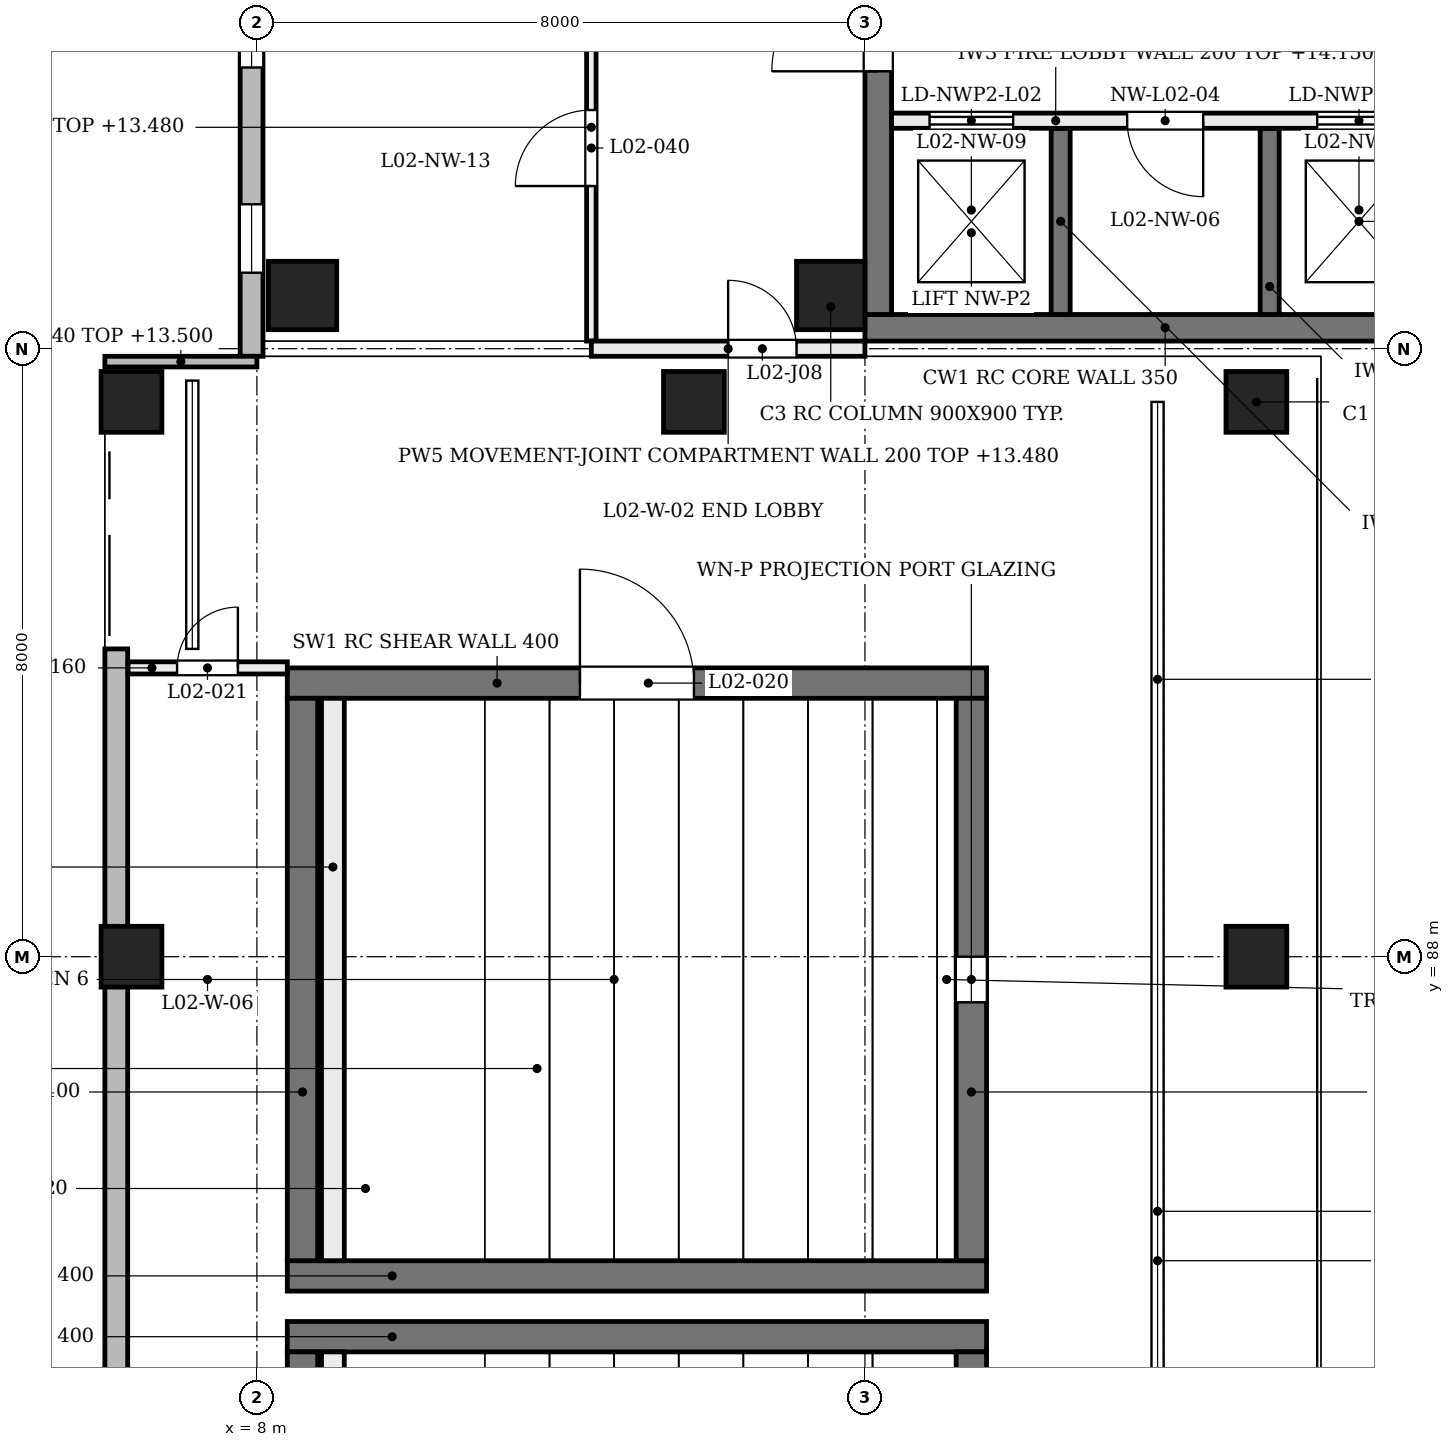
"""IFC4 building model, lengths in metres.
Left out: names, types, materials, properties, quantities, classifications, styles, units other than length and angle.
Written with IfcOpenShell. Run it as: python <this file> out.ifc"""

import sys

from ifc_helpers import new_model, si_unit, direction, frame, frame_2d, origin, origin_2d, place, context, subcontext, project, spatial, rectangle, extrude, element, fill, save


model = new_model("IFC4")
c1 = context("Model", 3, precision=1e-05, world=origin(), true_north=direction((0.0, 1.0)))
c2 = subcontext(c1, "Body", "Model", "MODEL_VIEW")
j1 = project(units=[si_unit("LENGTHUNIT", "METRE"), si_unit("PLANEANGLEUNIT", "RADIAN")], contexts=[c1])
p1 = place(None, origin())
s1 = spatial("IfcSite", under=j1, at=p1, CompositionType="ELEMENT")
p2 = place(p1, origin())
s2 = spatial("IfcBuilding", under=s1, at=p2, CompositionType="ELEMENT")
p3 = place(p2, frame((0.0, 0.0, 9.6)))
s3 = spatial("IfcBuildingStorey", under=s2, at=p3, CompositionType="ELEMENT", Elevation=9.6)
p4 = place(p3, frame((8.4, 83.0, 0.0), z_axis=(0.0, 0.0, 1.0), x_axis=(1.0, 0.0, 0.0)))
e1 = element("IfcWall", 1, at=p4, inside=s3, PredefinedType="SHEAR", context=c2, shape_type="SweptSolid", body=[
    extrude(rectangle(XDim=9.2, YDim=0.4, at=frame_2d((4.6, 0.0))), origin(), (0.0, 0.0, 1.0), 4.58),
])
p5 = place(p3, frame((8.6, 75.8, 0.0), z_axis=(0.0, 0.0, 1.0), x_axis=(0.0, 1.0, 0.0)))
e2 = element("IfcWall", 2, at=p5, inside=s3, PredefinedType="SHEAR", context=c2, shape_type="SweptSolid", body=[
    extrude(rectangle(XDim=7.0, YDim=0.4, at=frame_2d((3.5, 0.0))), origin(), (0.0, 0.0, 1.0), 4.58),
])
p6 = place(p3, frame((17.4, 75.8, 0.0), z_axis=(0.0, 0.0, 1.0), x_axis=(0.0, 1.0, 0.0)))
e3 = element("IfcWall", 3, at=p6, inside=s3, PredefinedType="SHEAR", context=c2, shape_type="SweptSolid", body=[
    extrude(rectangle(XDim=7.0, YDim=0.4, at=frame_2d((3.5, 0.0))), origin(), (0.0, 0.0, 1.0), 4.58),
])
p7 = place(p6, frame((2.825, 0.0, 0.0)))
e4 = element("IfcOpeningElement", 4, at=p7, cuts=e3, PredefinedType="OPENING", context=c2, shape_type="SweptSolid", body=[
    extrude(rectangle(XDim=1.5, YDim=2.1, at=frame_2d((0.75, 1.05))), frame((0.0, 0.21, 0.0), z_axis=(0.0, -1.0, 0.0), x_axis=(1.0, 0.0, 0.0)), (0.0, 0.0, 1.0), 0.42),
])
p8 = place(p6, frame((3.2, 0.0, 3.72)))
e5 = element("IfcOpeningElement", 5, at=p8, cuts=e3, PredefinedType="OPENING", context=c2, shape_type="SweptSolid", body=[
    extrude(rectangle(XDim=0.6, YDim=0.5, at=frame_2d((0.3, 0.25))), frame((0.0, 0.21, 0.0), z_axis=(0.0, -1.0, 0.0), x_axis=(1.0, 0.0, 0.0)), (0.0, 0.0, 1.0), 0.42),
])
p9 = place(p3, frame((8.4, 83.8, 0.0), z_axis=(0.0, 0.0, 1.0), x_axis=(1.0, 0.0, 0.0)))
e6 = element("IfcWall", 6, at=p9, inside=s3, PredefinedType="SHEAR", context=c2, shape_type="SweptSolid", body=[
    extrude(rectangle(XDim=9.2, YDim=0.4, at=frame_2d((4.6, 0.0))), origin(), (0.0, 0.0, 1.0), 4.58),
])
p10 = place(p3, frame((8.4, 91.6, 0.0), z_axis=(0.0, 0.0, 1.0), x_axis=(1.0, 0.0, 0.0)))
e7 = element("IfcWall", 7, at=p10, inside=s3, PredefinedType="SHEAR", context=c2, shape_type="SweptSolid", body=[
    extrude(rectangle(XDim=9.2, YDim=0.4, at=frame_2d((4.6, 0.0))), origin(), (0.0, 0.0, 1.0), 4.58),
])
p11 = place(p10, frame((3.85, 0.0, 0.0)))
e8 = element("IfcOpeningElement", 8, at=p11, cuts=e7, PredefinedType="OPENING", context=c2, shape_type="SweptSolid", body=[
    extrude(rectangle(XDim=1.5, YDim=2.1, at=frame_2d((0.75, 1.05))), frame((0.0, 0.21, 0.0), z_axis=(0.0, -1.0, 0.0), x_axis=(1.0, 0.0, 0.0)), (0.0, 0.0, 1.0), 0.42),
])
p12 = place(p3, frame((8.6, 84.0, 0.0), z_axis=(0.0, 0.0, 1.0), x_axis=(0.0, 1.0, 0.0)))
e9 = element("IfcWall", 9, at=p12, inside=s3, PredefinedType="SHEAR", context=c2, shape_type="SweptSolid", body=[
    extrude(rectangle(XDim=7.4, YDim=0.4, at=frame_2d((3.7, 0.0))), origin(), (0.0, 0.0, 1.0), 4.58),
])
p13 = place(p3, frame((17.4, 84.0, 0.0), z_axis=(0.0, 0.0, 1.0), x_axis=(0.0, 1.0, 0.0)))
e10 = element("IfcWall", 10, at=p13, inside=s3, PredefinedType="SHEAR", context=c2, shape_type="SweptSolid", body=[
    extrude(rectangle(XDim=7.4, YDim=0.4, at=frame_2d((3.7, 0.0))), origin(), (0.0, 0.0, 1.0), 4.58),
])
p14 = place(p13, frame((3.4, 0.0, 3.88)))
e11 = element("IfcOpeningElement", 11, at=p14, cuts=e10, PredefinedType="OPENING", context=c2, shape_type="SweptSolid", body=[
    extrude(rectangle(XDim=0.6, YDim=0.5, at=frame_2d((0.3, 0.25))), frame((0.0, 0.21, 0.0), z_axis=(0.0, -1.0, 0.0), x_axis=(1.0, 0.0, 0.0)), (0.0, 0.0, 1.0), 0.42),
])
p15 = place(p3, frame((16.0, 96.275, 0.0), z_axis=(0.0, 0.0, 1.0), x_axis=(1.0, 0.0, 0.0)))
e12 = element("IfcWall", 12, at=p15, inside=s3, PredefinedType="SHEAR", context=c2, shape_type="SweptSolid", body=[
    extrude(rectangle(XDim=7.9, YDim=0.35, at=frame_2d((3.95, 0.0))), origin(), (0.0, 0.0, 1.0), 4.58),
])
p16 = place(p3, frame((16.175, 96.45, 0.0), z_axis=(0.0, 0.0, 1.0), x_axis=(0.0, 1.0, 0.0)))
e13 = element("IfcWall", 13, at=p16, inside=s3, PredefinedType="SHEAR", context=c2, shape_type="SweptSolid", body=[
    extrude(rectangle(XDim=15.2, YDim=0.35, at=frame_2d((7.6, 0.0))), origin(), (0.0, 0.0, 1.0), 4.58),
])
p17 = place(p16, frame((13.25, 0.0, 0.0)))
e14 = element("IfcOpeningElement", 14, at=p17, cuts=e13, PredefinedType="OPENING", context=c2, shape_type="SweptSolid", body=[
    extrude(rectangle(XDim=1.0, YDim=2.1, at=frame_2d((0.5, 1.05))), frame((0.0, 0.185, 0.0), z_axis=(0.0, -1.0, 0.0), x_axis=(1.0, 0.0, 0.0)), (0.0, 0.0, 1.0), 0.37),
])
p18 = place(p16, frame((3.2, 0.0, 0.0)))
e15 = element("IfcOpeningElement", 15, at=p18, cuts=e13, PredefinedType="OPENING", context=c2, shape_type="SweptSolid", body=[
    extrude(rectangle(XDim=1.4, YDim=2.1, at=frame_2d((0.7, 1.05))), frame((0.0, 0.185, 0.0), z_axis=(0.0, -1.0, 0.0), x_axis=(1.0, 0.0, 0.0)), (0.0, 0.0, 1.0), 0.37),
])
for number, where, z_axis, x_axis in (
    (16, (8.6, 96.7, 0.0), (0.0, 0.0, 1.0), (1.0, 0.0, 0.0)),
    (17, (15.55, 96.7, 0.0), (0.0, 0.0, 1.0), (1.0, 0.0, 0.0)),
):
    element("IfcColumn", number, at=place(p3, frame(where, z_axis=z_axis, x_axis=x_axis)), inside=s3, PredefinedType="COLUMN", context=c2, shape_type="SweptSolid", body=[
        extrude(rectangle(XDim=0.9, YDim=0.9, at=origin_2d()), origin(), (0.0, 0.0, 1.0), 4.8),
    ])
for number, where, z_axis, x_axis in (
    (18, (6.6, 88.0, 0.0), (-0.204, 0.0, 0.979), (0.0, -1.0, 0.0)),
    (19, (6.6, 95.3, 0.0), (-0.204, 0.0, 0.979), (0.0, -1.0, 0.0)),
    (20, (14.0, 95.3, 0.0), (-0.204, 0.0, 0.979), (0.0, -1.0, 0.0)),
    (21, (21.4, 88.0, 0.0), (-0.204, 0.0, 0.979), (0.0, -1.0, 0.0)),
    (22, (21.4, 95.3, 0.0), (-0.204, 0.0, 0.979), (0.0, -1.0, 0.0)),
):
    element("IfcColumn", number, at=place(p3, frame(where, z_axis=z_axis, x_axis=x_axis)), inside=s3, PredefinedType="COLUMN", context=c2, shape_type="SweptSolid", body=[
        extrude(rectangle(XDim=0.8, YDim=0.8, at=origin_2d()), origin(), (0.0, 0.0, 1.0), 4.903),
    ])
p19 = place(p3, frame((6.15, 67.95, 0.0), z_axis=(0.0, 0.0, 1.0), x_axis=(0.0, 1.0, 0.0)))
e23 = element("IfcWall", 23, at=p19, inside=s3, PredefinedType="SOLIDWALL", context=c2, shape_type="SweptSolid", body=[
    extrude(rectangle(XDim=24.1, YDim=0.3, at=frame_2d((12.05, 0.0))), origin(), (0.0, 0.0, 1.0), 3.9),
])
p20 = place(p3, frame((19.85, 80.2, 4.1), z_axis=(0.0, 0.0, 1.0), x_axis=(0.0, 1.0, 0.0)))
e24 = element("IfcWall", 24, at=p20, inside=s3, PredefinedType="SOLIDWALL", context=c2, shape_type="SweptSolid", body=[
    extrude(rectangle(XDim=7.6, YDim=0.15, at=frame_2d((3.8, 0.0))), origin(), (0.0, 0.0, 1.0), 0.48),
])
p21 = place(p3, frame((19.85, 88.2, 4.1), z_axis=(0.0, 0.0, 1.0), x_axis=(0.0, 1.0, 0.0)))
e25 = element("IfcWall", 25, at=p21, inside=s3, PredefinedType="SOLIDWALL", context=c2, shape_type="SweptSolid", body=[
    extrude(rectangle(XDim=6.9, YDim=0.15, at=frame_2d((3.45, 0.0))), origin(), (0.0, 0.0, 1.0), 0.48),
])
p22 = place(p3, frame((7.93, 95.9, 0.0), z_axis=(0.0, 0.0, 1.0), x_axis=(0.0, 1.0, 0.0)))
e26 = element("IfcWall", 26, at=p22, inside=s3, PredefinedType="SOLIDWALL", context=c2, shape_type="SweptSolid", body=[
    extrude(rectangle(XDim=16.4, YDim=0.3, at=frame_2d((8.2, 0.0))), origin(), (0.0, 0.0, 1.0), 3.9),
])
p23 = place(p22, frame((1.1, 0.0, 0.75)))
e27 = element("IfcOpeningElement", 27, at=p23, cuts=e26, PredefinedType="OPENING", context=c2, shape_type="SweptSolid", body=[
    extrude(rectangle(XDim=0.9, YDim=3.1, at=frame_2d((0.45, 1.55))), frame((0.0, 0.16, 0.0), z_axis=(0.0, -1.0, 0.0), x_axis=(1.0, 0.0, 0.0)), (0.0, 0.0, 1.0), 0.32),
])
p24 = place(p22, frame((3.8, 0.0, 0.75)))
e28 = element("IfcOpeningElement", 28, at=p24, cuts=e26, PredefinedType="OPENING", context=c2, shape_type="SweptSolid", body=[
    extrude(rectangle(XDim=0.9, YDim=3.1, at=frame_2d((0.45, 1.55))), frame((0.0, 0.16, 0.0), z_axis=(0.0, -1.0, 0.0), x_axis=(1.0, 0.0, 0.0)), (0.0, 0.0, 1.0), 0.32),
])
p25 = place(p22, frame((6.5, 0.0, 0.75)))
e29 = element("IfcOpeningElement", 29, at=p25, cuts=e26, PredefinedType="OPENING", context=c2, shape_type="SweptSolid", body=[
    extrude(rectangle(XDim=0.9, YDim=3.1, at=frame_2d((0.45, 1.55))), frame((0.0, 0.16, 0.0), z_axis=(0.0, -1.0, 0.0), x_axis=(1.0, 0.0, 0.0)), (0.0, 0.0, 1.0), 0.32),
])
p26 = place(p22, frame((9.2, 0.0, 0.75)))
e30 = element("IfcOpeningElement", 30, at=p26, cuts=e26, PredefinedType="OPENING", context=c2, shape_type="SweptSolid", body=[
    extrude(rectangle(XDim=0.9, YDim=3.1, at=frame_2d((0.45, 1.55))), frame((0.0, 0.16, 0.0), z_axis=(0.0, -1.0, 0.0), x_axis=(1.0, 0.0, 0.0)), (0.0, 0.0, 1.0), 0.32),
])
p27 = place(p22, frame((11.9, 0.0, 0.75)))
e31 = element("IfcOpeningElement", 31, at=p27, cuts=e26, PredefinedType="OPENING", context=c2, shape_type="SweptSolid", body=[
    extrude(rectangle(XDim=0.9, YDim=3.1, at=frame_2d((0.45, 1.55))), frame((0.0, 0.16, 0.0), z_axis=(0.0, -1.0, 0.0), x_axis=(1.0, 0.0, 0.0)), (0.0, 0.0, 1.0), 0.32),
])
p28 = place(p22, frame((14.6, 0.0, 0.75)))
e32 = element("IfcOpeningElement", 32, at=p28, cuts=e26, PredefinedType="OPENING", context=c2, shape_type="SweptSolid", body=[
    extrude(rectangle(XDim=0.9, YDim=3.1, at=frame_2d((0.45, 1.55))), frame((0.0, 0.16, 0.0), z_axis=(0.0, -1.0, 0.0), x_axis=(1.0, 0.0, 0.0)), (0.0, 0.0, 1.0), 0.32),
])
p29 = place(p3, frame((6.0, 95.83, 0.0), z_axis=(0.0, 0.0, 1.0), x_axis=(1.0, 0.0, 0.0)))
e33 = element("IfcWall", 33, at=p29, inside=s3, PredefinedType="SOLIDWALL", context=c2, shape_type="SweptSolid", body=[
    extrude(rectangle(XDim=2.0, YDim=0.14, at=frame_2d((1.0, 0.0))), origin(), (0.0, 0.0, 1.0), 3.9),
])
for number, where, z_axis, x_axis in (
    (34, (18.575, 98.9, 0.0), (0.0, 0.0, 1.0), (0.0, -1.0, 0.0)),
    (35, (21.325, 98.9, 0.0), (0.0, 0.0, 1.0), (0.0, -1.0, 0.0)),
):
    element("IfcWall", number, at=place(p3, frame(where, z_axis=z_axis, x_axis=x_axis)), inside=s3, PredefinedType="SOLIDWALL", context=c2, shape_type="SweptSolid", body=[
        extrude(rectangle(XDim=2.45, YDim=0.25, at=frame_2d((1.225, 0.0))), origin(), (0.0, 0.0, 1.0), 4.55),
    ])
p30 = place(p3, frame((16.35, 99.0, 0.0), z_axis=(0.0, 0.0, 1.0), x_axis=(1.0, 0.0, 0.0)))
e36 = element("IfcWall", 36, at=p30, inside=s3, PredefinedType="SOLIDWALL", context=c2, shape_type="SweptSolid", body=[
    extrude(rectangle(XDim=7.2, YDim=0.2, at=frame_2d((3.6, 0.0))), origin(), (0.0, 0.0, 1.0), 4.55),
])
p31 = place(p30, frame((0.5, 0.0, 0.0)))
e37 = element("IfcOpeningElement", 37, at=p31, cuts=e36, PredefinedType="OPENING", context=c2, shape_type="SweptSolid", body=[
    extrude(rectangle(XDim=1.1, YDim=2.1, at=frame_2d((0.55, 1.05))), frame((0.0, 0.11, 0.0), z_axis=(0.0, -1.0, 0.0), x_axis=(1.0, 0.0, 0.0)), (0.0, 0.0, 1.0), 0.22),
])
p32 = place(p30, frame((5.6, 0.0, 0.0)))
e38 = element("IfcOpeningElement", 38, at=p32, cuts=e36, PredefinedType="OPENING", context=c2, shape_type="SweptSolid", body=[
    extrude(rectangle(XDim=1.1, YDim=2.1, at=frame_2d((0.55, 1.05))), frame((0.0, 0.11, 0.0), z_axis=(0.0, -1.0, 0.0), x_axis=(1.0, 0.0, 0.0)), (0.0, 0.0, 1.0), 0.22),
])
p33 = place(p30, frame((3.1, 0.0, 0.0)))
e39 = element("IfcOpeningElement", 39, at=p33, cuts=e36, PredefinedType="OPENING", context=c2, shape_type="SweptSolid", body=[
    extrude(rectangle(XDim=1.0, YDim=2.1, at=frame_2d((0.5, 1.05))), frame((0.0, 0.11, 0.0), z_axis=(0.0, -1.0, 0.0), x_axis=(1.0, 0.0, 0.0)), (0.0, 0.0, 1.0), 0.22),
])
p34 = place(p3, frame((6.305, 91.8, 0.0), z_axis=(0.0, 0.0, 1.0), x_axis=(1.0, 0.0, 0.0)))
e40 = element("IfcWall", 40, at=p34, inside=s3, PredefinedType="PARTITIONING", context=c2, shape_type="SweptSolid", body=[
    extrude(rectangle(XDim=2.095, YDim=0.16, at=frame_2d((1.047, 0.0))), origin(), (0.0, 0.0, 1.0), 4.56),
])
p35 = place(p34, frame((0.645, 0.0, 0.0)))
e41 = element("IfcOpeningElement", 41, at=p35, cuts=e40, PredefinedType="OPENING", context=c2, shape_type="SweptSolid", body=[
    extrude(rectangle(XDim=0.8, YDim=2.1, at=frame_2d((0.4, 1.05))), frame((0.0, 0.09, 0.0), z_axis=(0.0, -1.0, 0.0), x_axis=(1.0, 0.0, 0.0)), (0.0, 0.0, 1.0), 0.18),
])
p36 = place(p3, frame((12.4, 96.1, 0.0), z_axis=(0.0, 0.0, 1.0), x_axis=(0.0, 1.0, 0.0)))
e42 = element("IfcWall", 42, at=p36, inside=s3, PredefinedType="PARTITIONING", context=c2, shape_type="SweptSolid", body=[
    extrude(rectangle(XDim=9.377, YDim=0.125, at=frame_2d((4.688, 0.0))), origin(), (0.0, 0.0, 1.0), 3.88),
])
p37 = place(p36, frame((2.04, 0.0, 0.0)))
e43 = element("IfcOpeningElement", 43, at=p37, cuts=e42, PredefinedType="OPENING", context=c2, shape_type="SweptSolid", body=[
    extrude(rectangle(XDim=1.0, YDim=2.1, at=frame_2d((0.5, 1.05))), frame((0.0, 0.073, 0.0), z_axis=(0.0, -1.0, 0.0), x_axis=(1.0, 0.0, 0.0)), (0.0, 0.0, 1.0), 0.145),
])
p38 = place(p3, frame((12.4, 96.0, 0.0), z_axis=(0.0, 0.0, 1.0), x_axis=(1.0, 0.0, 0.0)))
e44 = element("IfcWall", 44, at=p38, inside=s3, PredefinedType="PARTITIONING", context=c2, shape_type="SweptSolid", body=[
    extrude(rectangle(XDim=3.6, YDim=0.2, at=frame_2d((1.8, 0.0))), origin(), (0.0, 0.0, 1.0), 3.88),
])
p39 = place(p38, frame((1.8, 0.0, 0.0)))
e45 = element("IfcOpeningElement", 45, at=p39, cuts=e44, PredefinedType="OPENING", context=c2, shape_type="SweptSolid", body=[
    extrude(rectangle(XDim=0.9, YDim=2.1, at=frame_2d((0.45, 1.05))), frame((0.0, 0.11, 0.0), z_axis=(0.0, -1.0, 0.0), x_axis=(1.0, 0.0, 0.0)), (0.0, 0.0, 1.0), 0.22),
])
p40 = place(p3, frame((9.0, 75.8, 0.0), z_axis=(0.0, 0.0, 1.0), x_axis=(0.0, 1.0, 0.0)))
e46 = element("IfcWall", 46, at=p40, inside=s3, PredefinedType="PARTITIONING", context=c2, shape_type="SweptSolid", body=[
    extrude(rectangle(XDim=7.0, YDim=0.3, at=frame_2d((3.5, 0.0))), origin(), (0.0, 0.0, 1.0), 6.95),
])
p41 = place(p3, frame((9.0, 84.0, 0.0), z_axis=(0.0, 0.0, 1.0), x_axis=(0.0, 1.0, 0.0)))
e47 = element("IfcWall", 47, at=p41, inside=s3, PredefinedType="PARTITIONING", context=c2, shape_type="SweptSolid", body=[
    extrude(rectangle(XDim=7.4, YDim=0.3, at=frame_2d((3.7, 0.0))), origin(), (0.0, 0.0, 1.0), 6.95),
])
p42 = place(p23, origin())
e48 = element("IfcWindow", 48, at=p42, inside=s3, PartitioningType="SINGLE_PANEL", PredefinedType="WINDOW", context=c2, shape_type="SweptSolid", body=[
    extrude(rectangle(XDim=0.9, YDim=3.1, at=frame_2d((0.45, 1.55))), frame((0.0, 0.03, 0.0), z_axis=(0.0, -1.0, 0.0), x_axis=(1.0, 0.0, 0.0)), (0.0, 0.0, 1.0), 0.06),
])
fill(e27, e48)
p43 = place(p24, origin())
e49 = element("IfcWindow", 49, at=p43, inside=s3, PartitioningType="SINGLE_PANEL", PredefinedType="WINDOW", context=c2, shape_type="SweptSolid", body=[
    extrude(rectangle(XDim=0.9, YDim=3.1, at=frame_2d((0.45, 1.55))), frame((0.0, 0.03, 0.0), z_axis=(0.0, -1.0, 0.0), x_axis=(1.0, 0.0, 0.0)), (0.0, 0.0, 1.0), 0.06),
])
fill(e28, e49)
p44 = place(p31, origin())
e50 = element("IfcDoor", 50, at=p44, inside=s3, OperationType="DOUBLE_DOOR_SLIDING", PredefinedType="DOOR", context=c2, shape_type="SweptSolid", body=[
    extrude(rectangle(XDim=1.1, YDim=2.1, at=frame_2d((0.55, 1.05))), frame((0.0, 0.025, 0.0), z_axis=(0.0, -1.0, 0.0), x_axis=(1.0, 0.0, 0.0)), (0.0, 0.0, 1.0), 0.05),
])
fill(e37, e50)
p45 = place(p32, origin())
e51 = element("IfcDoor", 51, at=p45, inside=s3, OperationType="DOUBLE_DOOR_SLIDING", PredefinedType="DOOR", context=c2, shape_type="SweptSolid", body=[
    extrude(rectangle(XDim=1.1, YDim=2.1, at=frame_2d((0.55, 1.05))), frame((0.0, 0.025, 0.0), z_axis=(0.0, -1.0, 0.0), x_axis=(1.0, 0.0, 0.0)), (0.0, 0.0, 1.0), 0.05),
])
fill(e38, e51)
p46 = place(p33, origin())
e52 = element("IfcDoor", 52, at=p46, inside=s3, OperationType="SINGLE_SWING_RIGHT", PredefinedType="DOOR", context=c2, shape_type="SweptSolid", body=[
    extrude(rectangle(XDim=1.0, YDim=2.1, at=frame_2d((0.5, 1.05))), frame((0.0, 0.025, 0.0), z_axis=(0.0, -1.0, 0.0), x_axis=(1.0, 0.0, 0.0)), (0.0, 0.0, 1.0), 0.05),
])
fill(e39, e52)
p47 = place(p18, origin())
e53 = element("IfcDoor", 53, at=p47, inside=s3, OperationType="SINGLE_SWING_LEFT", PredefinedType="DOOR", context=c2, shape_type="SweptSolid", body=[
    extrude(rectangle(XDim=1.4, YDim=2.1, at=frame_2d((0.7, 1.05))), frame((0.0, 0.025, 0.0), z_axis=(0.0, -1.0, 0.0), x_axis=(1.0, 0.0, 0.0)), (0.0, 0.0, 1.0), 0.05),
])
fill(e15, e53)
p48 = place(p11, origin())
e54 = element("IfcDoor", 54, at=p48, inside=s3, OperationType="SINGLE_SWING_LEFT", PredefinedType="DOOR", context=c2, shape_type="SweptSolid", body=[
    extrude(rectangle(XDim=1.5, YDim=2.1, at=frame_2d((0.75, 1.05))), frame((0.0, 0.025, 0.0), z_axis=(0.0, -1.0, 0.0), x_axis=(1.0, 0.0, 0.0)), (0.0, 0.0, 1.0), 0.05),
])
fill(e8, e54)
p49 = place(p35, frame((0.8, 0.0, 0.0), z_axis=(0.0, 0.0, 1.0), x_axis=(-1.0, 0.0, 0.0)))
e55 = element("IfcDoor", 55, at=p49, inside=s3, OperationType="SINGLE_SWING_RIGHT", PredefinedType="DOOR", context=c2, shape_type="SweptSolid", body=[
    extrude(rectangle(XDim=0.8, YDim=2.1, at=frame_2d((0.4, 1.05))), frame((0.0, 0.025, 0.0), z_axis=(0.0, -1.0, 0.0), x_axis=(1.0, 0.0, 0.0)), (0.0, 0.0, 1.0), 0.05),
])
fill(e41, e55)
p50 = place(p37, origin())
e56 = element("IfcDoor", 56, at=p50, inside=s3, OperationType="SINGLE_SWING_LEFT", PredefinedType="DOOR", context=c2, shape_type="SweptSolid", body=[
    extrude(rectangle(XDim=1.0, YDim=2.1, at=frame_2d((0.5, 1.05))), frame((0.0, 0.025, 0.0), z_axis=(0.0, -1.0, 0.0), x_axis=(1.0, 0.0, 0.0)), (0.0, 0.0, 1.0), 0.05),
])
fill(e43, e56)
p51 = place(p39, origin())
e57 = element("IfcDoor", 57, at=p51, inside=s3, OperationType="SINGLE_SWING_LEFT", PredefinedType="DOOR", context=c2, shape_type="SweptSolid", body=[
    extrude(rectangle(XDim=0.9, YDim=2.1, at=frame_2d((0.45, 1.05))), frame((0.0, 0.025, 0.0), z_axis=(0.0, -1.0, 0.0), x_axis=(1.0, 0.0, 0.0)), (0.0, 0.0, 1.0), 0.05),
])
fill(e45, e57)
p52 = place(p14, origin())
e58 = element("IfcWindow", 58, at=p52, inside=s3, PartitioningType="SINGLE_PANEL", PredefinedType="WINDOW", context=c2, shape_type="SweptSolid", body=[
    extrude(rectangle(XDim=0.6, YDim=0.5, at=frame_2d((0.3, 0.25))), frame((0.0, 0.03, 0.0), z_axis=(0.0, -1.0, 0.0), x_axis=(1.0, 0.0, 0.0)), (0.0, 0.0, 1.0), 0.06),
])
fill(e11, e58)
save(model, sys.argv[1])
